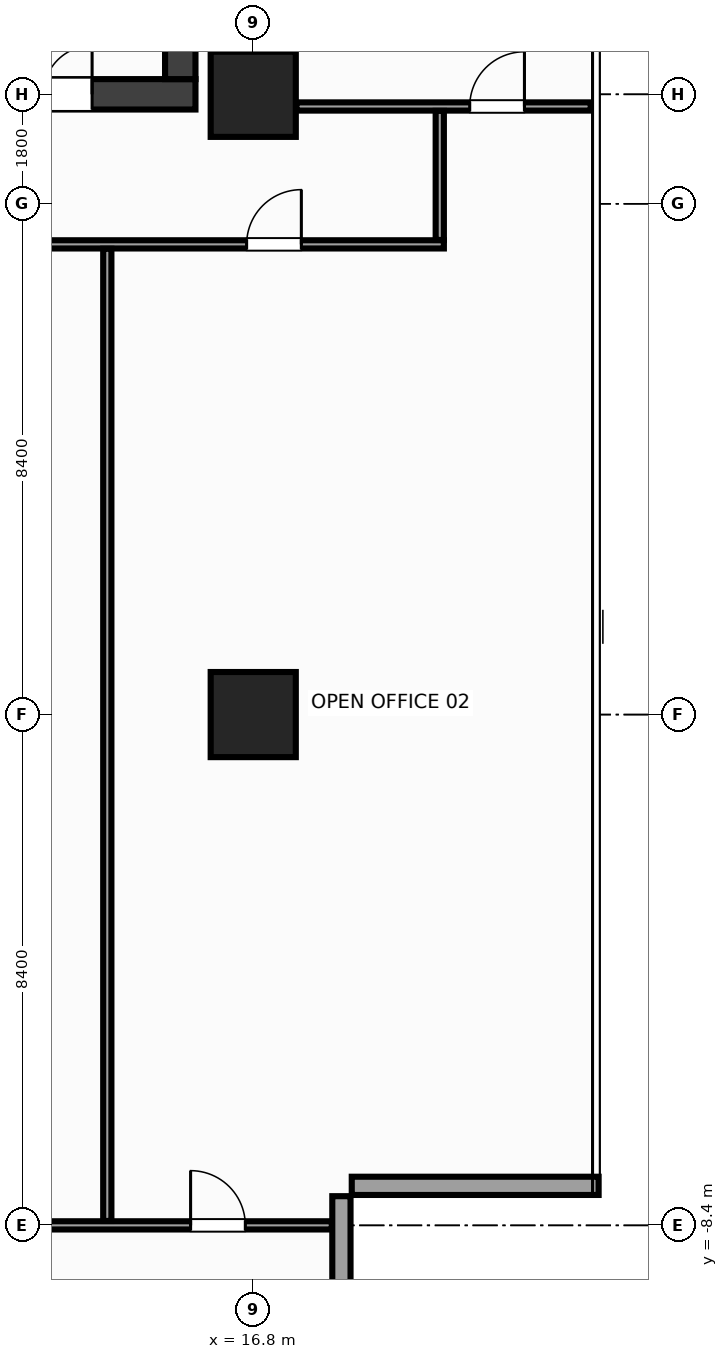
"""IFC4 building model, lengths in metres.
Left out: names, types, materials, properties, quantities, classifications, styles, units other than length and angle.
Written with IfcOpenShell. Run it as: python <this file> out.ifc"""

import sys

from ifc_helpers import new_model, si_unit, direction, frame, frame_2d, origin, origin_2d, place, context, subcontext, project, spatial, rectangle, extrude, source, transform, mapped, element, fill, save


model = new_model("IFC4")
c1 = context("Model", 3, precision=1e-05, world=origin(), true_north=direction((0.0, 1.0)))
c2 = subcontext(c1, "Body", "Model", "MODEL_VIEW")
j1 = project(units=[si_unit("LENGTHUNIT", "METRE"), si_unit("PLANEANGLEUNIT", "RADIAN")], contexts=[c1])
p1 = place(None, origin())
s1 = spatial("IfcSite", under=j1, at=p1, CompositionType="ELEMENT")
p2 = place(p1, origin())
s2 = spatial("IfcBuilding", under=s1, at=p2, CompositionType="ELEMENT")
p3 = place(p2, frame((0.0, 0.0, 236.0)))
s3 = spatial("IfcBuildingStorey", under=s2, at=p3, CompositionType="ELEMENT", Elevation=236.0)
m1 = source(origin(), c2, "Body", "SweptSolid", [
    extrude(rectangle(XDim=31.7, YDim=0.5, at=frame_2d((15.85, 0.0))), origin(), (0.0, 0.0, 1.0), 3.6),
])
p4 = place(p3, frame((-15.85, 10.2, 0.0), z_axis=(0.0, 0.0, 1.0), x_axis=(1.0, 0.0, 0.0)))
e1 = element("IfcWall", 1, at=p4, inside=s3, PredefinedType="SHEAR", context=c2, shape_type="MappedRepresentation", body=[
    mapped(m1, transform((0.0, 0.0, 0.0), x_axis=(1.0, 0.0, 0.0), y_axis=(0.0, 1.0, 0.0), z_axis=(0.0, 0.0, 1.0), scale=1.0)),
])
p5 = place(p4, frame((1.7, 0.0, 0.0)))
e2 = element("IfcOpeningElement", 2, at=p5, cuts=e1, PredefinedType="OPENING", context=c2, shape_type="SweptSolid", body=[
    extrude(rectangle(XDim=1.6, YDim=2.15, at=frame_2d((0.8, 1.075))), frame((0.0, 0.262, 0.0), z_axis=(0.0, -1.0, 0.0), x_axis=(1.0, 0.0, 0.0)), (0.0, 0.0, 1.0), 0.524),
])
p6 = place(p4, frame((28.4, 0.0, 0.0)))
e3 = element("IfcOpeningElement", 3, at=p6, cuts=e1, PredefinedType="OPENING", context=c2, shape_type="SweptSolid", body=[
    extrude(rectangle(XDim=1.6, YDim=2.15, at=frame_2d((0.8, 1.075))), frame((0.0, 0.262, 0.0), z_axis=(0.0, -1.0, 0.0), x_axis=(1.0, 0.0, 0.0)), (0.0, 0.0, 1.0), 0.524),
])
p7 = place(p4, frame((15.1, 0.0, 0.0)))
e4 = element("IfcOpeningElement", 4, at=p7, cuts=e1, PredefinedType="OPENING", context=c2, shape_type="SweptSolid", body=[
    extrude(rectangle(XDim=1.5, YDim=2.2, at=frame_2d((0.75, 1.1))), frame((0.0, 0.262, 0.0), z_axis=(0.0, -1.0, 0.0), x_axis=(1.0, 0.0, 0.0)), (0.0, 0.0, 1.0), 0.524),
])
m2 = source(origin(), c2, "Body", "SweptSolid", [
    extrude(rectangle(XDim=13.1, YDim=0.5, at=frame_2d((6.55, 0.0))), origin(), (0.0, 0.0, 1.0), 3.6),
])
p8 = place(p3, frame((15.6, 10.45, 0.0), z_axis=(0.0, 0.0, 1.0), x_axis=(0.0, 1.0, 0.0)))
e5 = element("IfcWall", 5, at=p8, inside=s3, PredefinedType="SHEAR", context=c2, shape_type="MappedRepresentation", body=[
    mapped(m2, transform((0.0, 0.0, 0.0), x_axis=(1.0, 0.0, 0.0), y_axis=(0.0, 1.0, 0.0), z_axis=(0.0, 0.0, 1.0), scale=1.0)),
])
m3 = source(origin(), c2, "Body", "SweptSolid", [
    extrude(rectangle(XDim=1.4, YDim=1.4, at=origin_2d()), origin(), (0.0, 0.0, 1.0), 3.6),
])
for number, where, z_axis, x_axis in (
    (6, (16.8, 0.0, 0.0), (0.0, 0.0, 1.0), (1.0, 0.0, 0.0)),
    (7, (16.8, 10.2, 0.0), (0.0, 0.0, 1.0), (1.0, 0.0, 0.0)),
):
    element("IfcColumn", number, at=place(p3, frame(where, z_axis=z_axis, x_axis=x_axis)), inside=s3, PredefinedType="COLUMN", context=c2, shape_type="MappedRepresentation", body=[
        mapped(m3, transform((0.0, 0.0, 0.0), x_axis=(1.0, 0.0, 0.0), y_axis=(0.0, 1.0, 0.0), z_axis=(0.0, 0.0, 1.0), scale=1.0)),
    ])
m4 = source(origin(), c2, "Body", "SweptSolid", [
    extrude(rectangle(XDim=4.06, YDim=0.3, at=frame_2d((2.03, 0.0))), origin(), (0.0, 0.0, 1.0), 2.75),
])
for number, where, z_axis, x_axis in (
    (8, (18.25, -11.98, 0.0), (0.0, 0.0, 1.0), (0.0, 1.0, 0.0)),
    (9, (18.42, -7.75, 0.0), (0.0, 0.0, 1.0), (1.0, 0.0, 0.0)),
):
    element("IfcWall", number, at=place(p3, frame(where, z_axis=z_axis, x_axis=x_axis)), inside=s3, PredefinedType="STANDARD", context=c2, shape_type="MappedRepresentation", body=[
        mapped(m4, transform((0.0, 0.0, 0.0), x_axis=(1.0, 0.0, 0.0), y_axis=(0.0, 1.0, 0.0), z_axis=(0.0, 0.0, 1.0), scale=1.0)),
    ])
m5 = source(origin(), c2, "Body", "SweptSolid", [
    extrude(rectangle(XDim=4.84, YDim=0.135, at=frame_2d((2.42, 0.0))), origin(), (0.0, 0.0, 1.0), 3.37),
])
p9 = place(p3, frame((17.51, 10.0, 0.0), z_axis=(0.0, 0.0, 1.0), x_axis=(1.0, 0.0, 0.0)))
e10 = element("IfcWall", 10, at=p9, inside=s3, PredefinedType="PARTITIONING", context=c2, shape_type="MappedRepresentation", body=[
    mapped(m5, transform((0.0, 0.0, 0.0), x_axis=(1.0, 0.0, 0.0), y_axis=(0.0, 1.0, 0.0), z_axis=(0.0, 0.0, 1.0), scale=1.0)),
])
p10 = place(p9, frame((2.85, 0.0, 0.0)))
e11 = element("IfcOpeningElement", 11, at=p10, cuts=e10, PredefinedType="OPENING", context=c2, shape_type="SweptSolid", body=[
    extrude(rectangle(XDim=0.9, YDim=2.15, at=frame_2d((0.45, 1.075))), frame((0.0, 0.08, 0.0), z_axis=(0.0, -1.0, 0.0), x_axis=(1.0, 0.0, 0.0)), (0.0, 0.0, 1.0), 0.159),
])
m6 = source(origin(), c2, "Body", "SweptSolid", [
    extrude(rectangle(XDim=21.9, YDim=0.135, at=frame_2d((10.95, 0.0))), origin(), (0.0, 0.0, 1.0), 2.755),
])
p11 = place(p3, frame((-1.965, 7.732, 0.0), z_axis=(0.0, 0.0, 1.0), x_axis=(1.0, 0.0, 0.0)))
e12 = element("IfcWall", 12, at=p11, inside=s3, PredefinedType="PARTITIONING", context=c2, shape_type="MappedRepresentation", body=[
    mapped(m6, transform((0.0, 0.0, 0.0), x_axis=(1.0, 0.0, 0.0), y_axis=(0.0, 1.0, 0.0), z_axis=(0.0, 0.0, 1.0), scale=1.0)),
])
p12 = place(p11, frame((18.656, 0.0, 0.0)))
e13 = element("IfcOpeningElement", 13, at=p12, cuts=e12, PredefinedType="OPENING", context=c2, shape_type="SweptSolid", body=[
    extrude(rectangle(XDim=0.9, YDim=2.15, at=frame_2d((0.45, 1.075))), frame((0.0, 0.08, 0.0), z_axis=(0.0, -1.0, 0.0), x_axis=(1.0, 0.0, 0.0)), (0.0, 0.0, 1.0), 0.159),
])
p13 = place(p11, frame((8.115, 0.0, 0.0)))
e14 = element("IfcOpeningElement", 14, at=p13, cuts=e12, PredefinedType="OPENING", context=c2, shape_type="SweptSolid", body=[
    extrude(rectangle(XDim=0.9, YDim=2.15, at=frame_2d((0.45, 1.075))), frame((0.0, 0.08, 0.0), z_axis=(0.0, -1.0, 0.0), x_axis=(1.0, 0.0, 0.0)), (0.0, 0.0, 1.0), 0.159),
])
m7 = source(origin(), c2, "Body", "SweptSolid", [
    extrude(rectangle(XDim=2.123, YDim=0.135, at=frame_2d((1.061, 0.0))), origin(), (0.0, 0.0, 1.0), 3.37),
])
p14 = place(p3, frame((19.867, 7.805, 0.0), z_axis=(0.0, 0.0, 1.0), x_axis=(0.0, 1.0, 0.0)))
e15 = element("IfcWall", 15, at=p14, inside=s3, PredefinedType="PARTITIONING", context=c2, shape_type="MappedRepresentation", body=[
    mapped(m7, transform((0.0, 0.0, 0.0), x_axis=(1.0, 0.0, 0.0), y_axis=(0.0, 1.0, 0.0), z_axis=(0.0, 0.0, 1.0), scale=1.0)),
])
m8 = source(origin(), c2, "Body", "SweptSolid", [
    extrude(rectangle(XDim=36.184, YDim=0.135, at=frame_2d((18.092, 0.0))), origin(), (0.0, 0.0, 1.0), 2.755),
])
p15 = place(p3, frame((-18.092, -8.4, 0.0), z_axis=(0.0, 0.0, 1.0), x_axis=(1.0, 0.0, 0.0)))
e16 = element("IfcWall", 16, at=p15, inside=s3, PredefinedType="PARTITIONING", context=c2, shape_type="MappedRepresentation", body=[
    mapped(m8, transform((0.0, 0.0, 0.0), x_axis=(1.0, 0.0, 0.0), y_axis=(0.0, 1.0, 0.0), z_axis=(0.0, 0.0, 1.0), scale=1.0)),
])
p16 = place(p15, frame((1.022, 0.0, 0.0)))
e17 = element("IfcOpeningElement", 17, at=p16, cuts=e16, PredefinedType="OPENING", context=c2, shape_type="SweptSolid", body=[
    extrude(rectangle(XDim=0.9, YDim=2.15, at=frame_2d((0.45, 1.075))), frame((0.0, 0.08, 0.0), z_axis=(0.0, -1.0, 0.0), x_axis=(1.0, 0.0, 0.0)), (0.0, 0.0, 1.0), 0.159),
])
p17 = place(p15, frame((9.142, 0.0, 0.0)))
e18 = element("IfcOpeningElement", 18, at=p17, cuts=e16, PredefinedType="OPENING", context=c2, shape_type="SweptSolid", body=[
    extrude(rectangle(XDim=0.9, YDim=2.15, at=frame_2d((0.45, 1.075))), frame((0.0, 0.08, 0.0), z_axis=(0.0, -1.0, 0.0), x_axis=(1.0, 0.0, 0.0)), (0.0, 0.0, 1.0), 0.159),
])
p18 = place(p15, frame((33.862, 0.0, 0.0)))
e19 = element("IfcOpeningElement", 19, at=p18, cuts=e16, PredefinedType="OPENING", context=c2, shape_type="SweptSolid", body=[
    extrude(rectangle(XDim=0.9, YDim=2.15, at=frame_2d((0.45, 1.075))), frame((0.0, 0.08, 0.0), z_axis=(0.0, -1.0, 0.0), x_axis=(1.0, 0.0, 0.0)), (0.0, 0.0, 1.0), 0.159),
])
p19 = place(p15, frame((18.942, 0.0, 0.0)))
e20 = element("IfcOpeningElement", 20, at=p19, cuts=e16, PredefinedType="OPENING", context=c2, shape_type="SweptSolid", body=[
    extrude(rectangle(XDim=0.9, YDim=2.15, at=frame_2d((0.45, 1.075))), frame((0.0, 0.08, 0.0), z_axis=(0.0, -1.0, 0.0), x_axis=(1.0, 0.0, 0.0)), (0.0, 0.0, 1.0), 0.159),
])
p20 = place(p15, frame((25.542, 0.0, 0.0)))
e21 = element("IfcOpeningElement", 21, at=p20, cuts=e16, PredefinedType="OPENING", context=c2, shape_type="SweptSolid", body=[
    extrude(rectangle(XDim=0.9, YDim=2.15, at=frame_2d((0.45, 1.075))), frame((0.0, 0.08, 0.0), z_axis=(0.0, -1.0, 0.0), x_axis=(1.0, 0.0, 0.0)), (0.0, 0.0, 1.0), 0.159),
])
m9 = source(origin(), c2, "Body", "SweptSolid", [
    extrude(rectangle(XDim=15.987, YDim=0.135, at=frame_2d((7.994, 0.0))), origin(), (0.0, 0.0, 1.0), 2.655),
])
p21 = place(p3, frame((14.4, -8.327, 0.0), z_axis=(0.0, 0.0, 1.0), x_axis=(0.0, 1.0, 0.0)))
e22 = element("IfcWall", 22, at=p21, inside=s3, PredefinedType="PARTITIONING", context=c2, shape_type="MappedRepresentation", body=[
    mapped(m9, transform((0.0, 0.0, 0.0), x_axis=(1.0, 0.0, 0.0), y_axis=(0.0, 1.0, 0.0), z_axis=(0.0, 0.0, 1.0), scale=1.0)),
])
m10 = source(origin(), c2, "Body", "SweptSolid", [
    extrude(rectangle(XDim=1.6, YDim=2.15, at=frame_2d((0.8, 1.075))), frame((0.0, 0.025, 0.0), z_axis=(0.0, -1.0, 0.0), x_axis=(1.0, 0.0, 0.0)), (0.0, 0.0, 1.0), 0.05),
])
p22 = place(p6, origin())
e23 = element("IfcDoor", 23, at=p22, inside=s3, OperationType="DOUBLE_DOOR_SINGLE_SWING", PredefinedType="DOOR", context=c2, shape_type="MappedRepresentation", body=[
    mapped(m10, transform((0.0, 0.0, 0.0), x_axis=(1.0, 0.0, 0.0), y_axis=(0.0, 1.0, 0.0), z_axis=(0.0, 0.0, 1.0), scale=1.0)),
])
fill(e3, e23)
m11 = source(origin(), c2, "Body", "SweptSolid", [
    extrude(rectangle(XDim=0.9, YDim=2.15, at=frame_2d((0.45, 1.075))), frame((0.0, 0.025, 0.0), z_axis=(0.0, -1.0, 0.0), x_axis=(1.0, 0.0, 0.0)), (0.0, 0.0, 1.0), 0.05),
])
p23 = place(p12, origin())
e24 = element("IfcDoor", 24, at=p23, inside=s3, OperationType="SINGLE_SWING_RIGHT", PredefinedType="DOOR", context=c2, shape_type="MappedRepresentation", body=[
    mapped(m11, transform((0.0, 0.0, 0.0), x_axis=(1.0, 0.0, 0.0), y_axis=(0.0, 1.0, 0.0), z_axis=(0.0, 0.0, 1.0), scale=1.0)),
])
fill(e13, e24)
p24 = place(p10, origin())
e25 = element("IfcDoor", 25, at=p24, inside=s3, OperationType="SINGLE_SWING_RIGHT", PredefinedType="DOOR", context=c2, shape_type="MappedRepresentation", body=[
    mapped(m11, transform((0.0, 0.0, 0.0), x_axis=(1.0, 0.0, 0.0), y_axis=(0.0, 1.0, 0.0), z_axis=(0.0, 0.0, 1.0), scale=1.0)),
])
fill(e11, e25)
p25 = place(p18, origin())
e26 = element("IfcDoor", 26, at=p25, inside=s3, OperationType="SINGLE_SWING_LEFT", PredefinedType="DOOR", context=c2, shape_type="MappedRepresentation", body=[
    mapped(m11, transform((0.0, 0.0, 0.0), x_axis=(1.0, 0.0, 0.0), y_axis=(0.0, 1.0, 0.0), z_axis=(0.0, 0.0, 1.0), scale=1.0)),
])
fill(e19, e26)
save(model, sys.argv[1])
